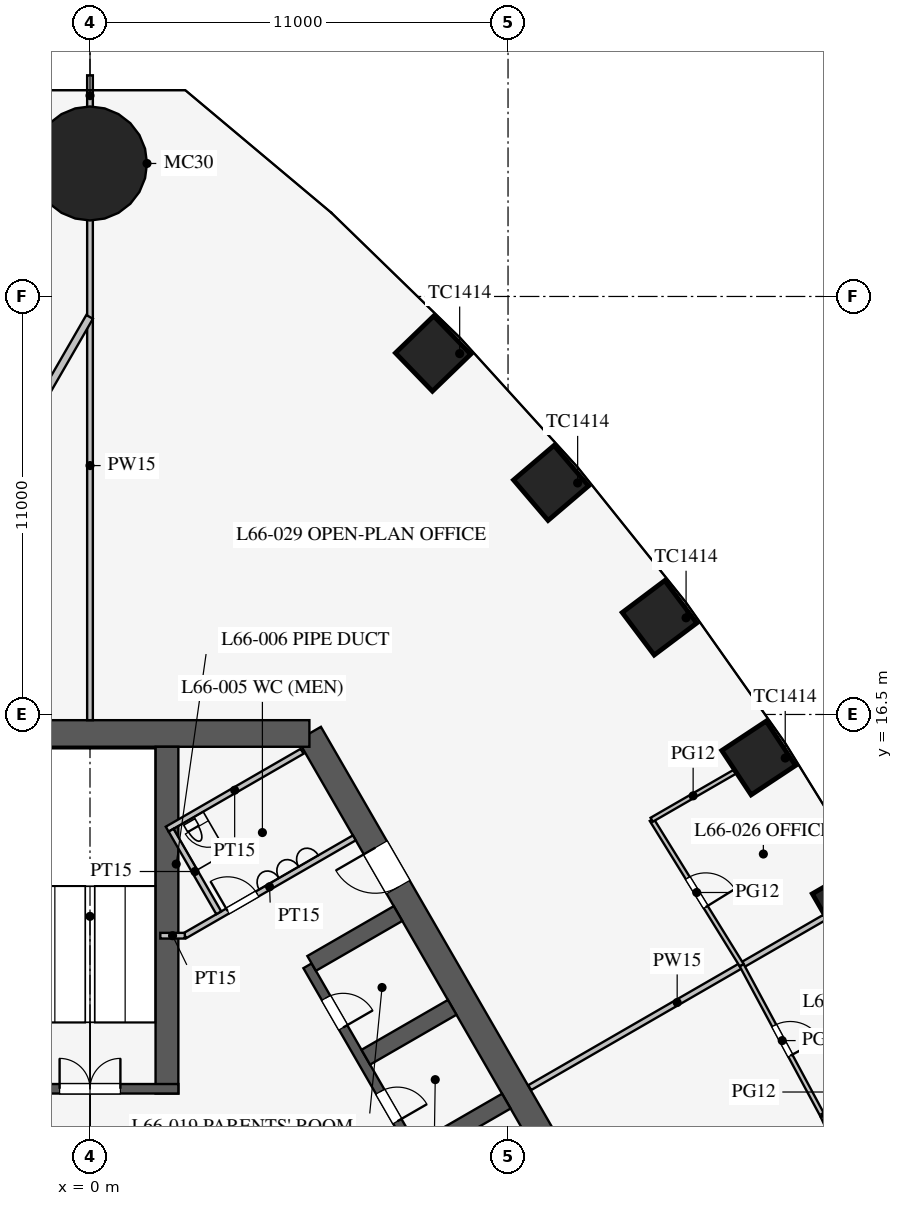
"""IFC4 building model, lengths in metres.
Left out: names, types, materials, properties, quantities, classifications, styles, units other than length and angle.
Written with IfcOpenShell. Run it as: python <this file> out.ifc"""

import sys

from ifc_helpers import new_model, si_unit, direction, frame, frame_2d, origin, origin_2d, place, context, subcontext, project, spatial, rectangle, circle, extrude, element, fill, save


model = new_model("IFC4")
c1 = context("Model", 3, precision=1e-05, world=origin(), true_north=direction((0.0, 1.0)))
c2 = subcontext(c1, "Body", "Model", "MODEL_VIEW")
j1 = project(units=[si_unit("LENGTHUNIT", "METRE"), si_unit("PLANEANGLEUNIT", "RADIAN")], contexts=[c1])
p1 = place(None, origin())
s1 = spatial("IfcSite", under=j1, at=p1, CompositionType="ELEMENT")
p2 = place(p1, origin())
s2 = spatial("IfcBuilding", under=s1, at=p2, CompositionType="ELEMENT")
p3 = place(p2, frame((0.0, 0.0, 288.9)))
s3 = spatial("IfcBuildingStorey", under=s2, at=p3, CompositionType="ELEMENT", Elevation=288.9)
for number, where, z_axis, x_axis in (
    (1, (19.963, 11.526, 0.0), (0.0, 0.0, 1.0), (-0.5, 0.866, 0.0)),
    (2, (17.594, 15.354, 0.0), (0.0, 0.0, 1.0), (-0.552, 0.834, 0.0)),
    (3, (14.985, 19.044, 0.0), (0.0, 0.0, 1.0), (-0.601, 0.799, 0.0)),
    (4, (12.132, 22.593, 0.0), (0.0, 0.0, 1.0), (-0.649, 0.761, 0.0)),
    (5, (9.027, 25.997, 0.0), (0.0, 0.0, 1.0), (-0.695, 0.719, 0.0)),
):
    element("IfcColumn", number, at=place(p3, frame(where, z_axis=z_axis, x_axis=x_axis)), inside=s3, PredefinedType="COLUMN", context=c2, shape_type="SweptSolid", body=[
        extrude(rectangle(XDim=1.4, YDim=1.4, at=origin_2d()), origin(), (0.0, 0.0, 1.0), 4.2),
    ])
p4 = place(p3, frame((0.0, 31.0, 0.0), z_axis=(0.0, 0.0, 1.0), x_axis=(1.0, 0.0, 0.0)))
e6 = element("IfcColumn", 6, at=p4, inside=s3, PredefinedType="COLUMN", context=c2, shape_type="SweptSolid", body=[
    extrude(circle(Radius=1.5, at=origin_2d()), origin(), (0.0, 0.0, 1.0), 4.2),
])
p5 = place(p3, frame((16.743, -3.0, 0.0), z_axis=(0.0, 0.0, 1.0), x_axis=(-0.500002442456, 0.866023993627, 0.0)))
e7 = element("IfcWall", 7, at=p5, inside=s3, PredefinedType="SHEAR", context=c2, shape_type="SweptSolid", body=[
    extrude(rectangle(XDim=21.939, YDim=0.7, at=frame_2d((10.97, 0.0))), origin(), (0.0, 0.0, 1.0), 4.2),
])
p6 = place(p5, frame((17.27, 0.0, 0.0)))
e8 = element("IfcOpeningElement", 8, at=p6, cuts=e7, PredefinedType="OPENING", context=c2, shape_type="SweptSolid", body=[
    extrude(rectangle(XDim=1.2, YDim=2.1, at=frame_2d((0.6, 1.05))), frame((0.0, 0.36, 0.0), z_axis=(0.0, -1.0, 0.0), x_axis=(1.0, 0.0, 0.0)), (0.0, 0.0, 1.0), 0.72),
])
p7 = place(p5, frame((3.47, 0.0, 0.0)))
e9 = element("IfcOpeningElement", 9, at=p7, cuts=e7, PredefinedType="OPENING", context=c2, shape_type="SweptSolid", body=[
    extrude(rectangle(XDim=1.2, YDim=2.1, at=frame_2d((0.6, 1.05))), frame((0.0, 0.36, 0.0), z_axis=(0.0, -1.0, 0.0), x_axis=(1.0, 0.0, 0.0)), (0.0, 0.0, 1.0), 0.72),
])
p8 = place(p3, frame((5.773, 16.0, 0.0), z_axis=(0.0, 0.0, 1.0), x_axis=(-1.0, 0.0, 0.0)))
e10 = element("IfcWall", 10, at=p8, inside=s3, PredefinedType="SHEAR", context=c2, shape_type="SweptSolid", body=[
    extrude(rectangle(XDim=11.547, YDim=0.7, at=frame_2d((5.773, 0.0))), origin(), (0.0, 0.0, 1.0), 4.2),
])
p9 = place(p3, frame((11.424, 0.014, 0.0), z_axis=(0.0, 0.0, 1.0), x_axis=(-0.500001763848, 0.866024385424, 0.0)))
e11 = element("IfcWall", 11, at=p9, inside=s3, PredefinedType="SHEAR", context=c2, shape_type="SweptSolid", body=[
    extrude(rectangle(XDim=11.4, YDim=0.25, at=frame_2d((5.7, 0.0))), origin(), (0.0, 0.0, 1.0), 4.2),
])
p10 = place(p9, frame((0.975, 0.0, 0.0)))
e12 = element("IfcOpeningElement", 12, at=p10, cuts=e11, PredefinedType="OPENING", context=c2, shape_type="SweptSolid", body=[
    extrude(rectangle(XDim=0.9, YDim=2.1, at=frame_2d((0.45, 1.05))), frame((0.0, 0.135, 0.0), z_axis=(0.0, -1.0, 0.0), x_axis=(1.0, 0.0, 0.0)), (0.0, 0.0, 1.0), 0.27),
])
p11 = place(p9, frame((3.825, 0.0, 0.0)))
e13 = element("IfcOpeningElement", 13, at=p11, cuts=e11, PredefinedType="OPENING", context=c2, shape_type="SweptSolid", body=[
    extrude(rectangle(XDim=0.9, YDim=2.1, at=frame_2d((0.45, 1.05))), frame((0.0, 0.135, 0.0), z_axis=(0.0, -1.0, 0.0), x_axis=(1.0, 0.0, 0.0)), (0.0, 0.0, 1.0), 0.27),
])
p12 = place(p9, frame((6.675, 0.0, 0.0)))
e14 = element("IfcOpeningElement", 14, at=p12, cuts=e11, PredefinedType="OPENING", context=c2, shape_type="SweptSolid", body=[
    extrude(rectangle(XDim=0.9, YDim=2.1, at=frame_2d((0.45, 1.05))), frame((0.0, 0.135, 0.0), z_axis=(0.0, -1.0, 0.0), x_axis=(1.0, 0.0, 0.0)), (0.0, 0.0, 1.0), 0.27),
])
p13 = place(p9, frame((9.525, 0.0, 0.0)))
e15 = element("IfcOpeningElement", 15, at=p13, cuts=e11, PredefinedType="OPENING", context=c2, shape_type="SweptSolid", body=[
    extrude(rectangle(XDim=0.9, YDim=2.1, at=frame_2d((0.45, 1.05))), frame((0.0, 0.135, 0.0), z_axis=(0.0, -1.0, 0.0), x_axis=(1.0, 0.0, 0.0)), (0.0, 0.0, 1.0), 0.27),
])
for number, where, z_axis, x_axis in (
    (16, (8.682, 5.012, 0.0), (0.0, 0.0, 1.0), (0.866, 0.5, 0.0)),
    (17, (7.257, 7.481, 0.0), (0.0, 0.0, 1.0), (0.866, 0.5, 0.0)),
    (18, (5.832, 9.949, 0.0), (0.0, 0.0, 1.0), (0.866, 0.5, 0.0)),
):
    element("IfcWall", number, at=place(p3, frame(where, z_axis=z_axis, x_axis=x_axis)), inside=s3, PredefinedType="SHEAR", context=c2, shape_type="SweptSolid", body=[
        extrude(rectangle(XDim=2.625, YDim=0.45, at=frame_2d((1.312, 0.0))), origin(), (0.0, 0.0, 1.0), 4.2),
    ])
p14 = place(p3, frame((2.025, 6.525, 0.0), z_axis=(0.0, 0.0, 1.0), x_axis=(0.0, 1.0, 0.0)))
e19 = element("IfcWall", 19, at=p14, inside=s3, PredefinedType="SHEAR", context=c2, shape_type="SweptSolid", body=[
    extrude(rectangle(XDim=9.125, YDim=0.6, at=frame_2d((4.562, 0.0))), origin(), (0.0, 0.0, 1.0), 4.2),
])
p15 = place(p3, frame((2.325, 6.65, 0.0), z_axis=(0.0, 0.0, 1.0), x_axis=(-1.0, 0.0, 0.0)))
e20 = element("IfcWall", 20, at=p15, inside=s3, PredefinedType="SHEAR", context=c2, shape_type="SweptSolid", body=[
    extrude(rectangle(XDim=4.65, YDim=0.25, at=frame_2d((2.325, 0.0))), origin(), (0.0, 0.0, 1.0), 4.2),
])
p16 = place(p15, frame((1.525, 0.0, 0.0)))
e21 = element("IfcOpeningElement", 21, at=p16, cuts=e20, PredefinedType="OPENING", context=c2, shape_type="SweptSolid", body=[
    extrude(rectangle(XDim=1.6, YDim=2.1, at=frame_2d((0.8, 1.05))), frame((0.0, 0.135, 0.0), z_axis=(0.0, -1.0, 0.0), x_axis=(1.0, 0.0, 0.0)), (0.0, 0.0, 1.0), 0.27),
])
p17 = place(p3, frame((2.495, 10.678, 0.0), z_axis=(0.0, 0.0, 1.0), x_axis=(0.866037967349, 0.499978238636, 0.0)))
e22 = element("IfcWall", 22, at=p17, inside=s3, PredefinedType="PARTITIONING", context=c2, shape_type="SweptSolid", body=[
    extrude(rectangle(XDim=5.15, YDim=0.15, at=frame_2d((2.575, 0.0))), origin(), (0.0, 0.0, 1.0), 4.0),
])
p18 = place(p17, frame((1.3, 0.0, 0.0)))
e23 = element("IfcOpeningElement", 23, at=p18, cuts=e22, PredefinedType="OPENING", context=c2, shape_type="SweptSolid", body=[
    extrude(rectangle(XDim=0.9, YDim=2.1, at=frame_2d((0.45, 1.05))), frame((0.0, 0.085, 0.0), z_axis=(0.0, -1.0, 0.0), x_axis=(1.0, 0.0, 0.0)), (0.0, 0.0, 1.0), 0.17),
])
p19 = place(p3, frame((2.495, 10.678, 0.0), z_axis=(0.0, 0.0, 1.0), x_axis=(-1.0, 0.0, 0.0)))
e24 = element("IfcWall", 24, at=p19, inside=s3, PredefinedType="PARTITIONING", context=c2, shape_type="SweptSolid", body=[
    extrude(rectangle(XDim=0.645, YDim=0.15, at=frame_2d((0.323, 0.0))), origin(), (0.0, 0.0, 1.0), 4.0),
])
p20 = place(p3, frame((2.031, 13.482, 0.0), z_axis=(0.0, 0.0, 1.0), x_axis=(0.866050731258, 0.499956128963, 0.0)))
e25 = element("IfcWall", 25, at=p20, inside=s3, PredefinedType="PARTITIONING", context=c2, shape_type="SweptSolid", body=[
    extrude(rectangle(XDim=4.1, YDim=0.15, at=frame_2d((2.05, 0.0))), origin(), (0.0, 0.0, 1.0), 4.0),
])
p21 = place(p3, frame((3.389, 11.281, 0.0), z_axis=(0.0, 0.0, 1.0), x_axis=(-0.499989096993, 0.866031698547, 0.0)))
e26 = element("IfcWall", 26, at=p21, inside=s3, PredefinedType="PARTITIONING", context=c2, shape_type="SweptSolid", body=[
    extrude(rectangle(XDim=2.51, YDim=0.15, at=frame_2d((1.255, 0.0))), origin(), (0.0, 0.0, 1.0), 4.0),
])
p22 = place(p3, frame((0.0, 16.35, 0.0), z_axis=(0.0, 0.0, 1.0), x_axis=(0.0, 1.0, 0.0)))
e27 = element("IfcWall", 27, at=p22, inside=s3, PredefinedType="PARTITIONING", context=c2, shape_type="SweptSolid", body=[
    extrude(rectangle(XDim=13.4, YDim=0.15, at=frame_2d((6.7, 0.0))), origin(), (0.0, 0.0, 1.0), 2.5),
])
p23 = place(p3, frame((0.0, 32.25, 0.0), z_axis=(0.0, 0.0, 1.0), x_axis=(0.0, 1.0, 0.0)))
e28 = element("IfcWall", 28, at=p23, inside=s3, PredefinedType="PARTITIONING", context=c2, shape_type="SweptSolid", body=[
    extrude(rectangle(XDim=1.07, YDim=0.15, at=frame_2d((0.535, 0.0))), origin(), (0.0, 0.0, 1.0), 2.5),
])
p24 = place(p3, frame((11.57, 6.68, 0.0), z_axis=(0.0, 0.0, 1.0), x_axis=(0.866018180823, 0.500012510328, 0.0)))
e29 = element("IfcWall", 29, at=p24, inside=s3, PredefinedType="PARTITIONING", context=c2, shape_type="SweptSolid", body=[
    extrude(rectangle(XDim=8.962, YDim=0.15, at=frame_2d((4.481, 0.0))), origin(), (0.0, 0.0, 1.0), 3.3),
])
p25 = place(p3, frame((17.149, 9.901, 0.0), z_axis=(0.0, 0.0, 1.0), x_axis=(-0.525981173851, 0.850496210899, 0.0)))
e30 = element("IfcWall", 30, at=p25, inside=s3, PredefinedType="PARTITIONING", context=c2, shape_type="SweptSolid", body=[
    extrude(rectangle(XDim=4.502, YDim=0.12, at=frame_2d((2.251, 0.0))), origin(), (0.0, 0.0, 1.0), 2.9),
])
p26 = place(p25, frame((1.8, 0.0, 0.15)))
e31 = element("IfcOpeningElement", 31, at=p26, cuts=e30, PredefinedType="OPENING", context=c2, shape_type="SweptSolid", body=[
    extrude(rectangle(XDim=0.9, YDim=2.1, at=frame_2d((0.45, 1.05))), frame((0.0, 0.07, 0.0), z_axis=(0.0, -1.0, 0.0), x_axis=(1.0, 0.0, 0.0)), (0.0, 0.0, 1.0), 0.14),
])
p27 = place(p3, frame((19.281, 5.936, 0.0), z_axis=(0.0, 0.0, 1.0), x_axis=(-0.473566170147, 0.880758242932, 0.0)))
e32 = element("IfcWall", 32, at=p27, inside=s3, PredefinedType="PARTITIONING", context=c2, shape_type="SweptSolid", body=[
    extrude(rectangle(XDim=4.502, YDim=0.12, at=frame_2d((2.251, 0.0))), origin(), (0.0, 0.0, 1.0), 2.9),
])
p28 = place(p27, frame((1.8, 0.0, 0.15)))
e33 = element("IfcOpeningElement", 33, at=p28, cuts=e32, PredefinedType="OPENING", context=c2, shape_type="SweptSolid", body=[
    extrude(rectangle(XDim=0.9, YDim=2.1, at=frame_2d((0.45, 1.05))), frame((0.0, 0.07, 0.0), z_axis=(0.0, -1.0, 0.0), x_axis=(1.0, 0.0, 0.0)), (0.0, 0.0, 1.0), 0.14),
])
p29 = place(p3, frame((21.175, 1.833, 0.0), z_axis=(0.0, 0.0, 1.0), x_axis=(-0.419270595022, 0.907861315483, 0.0)))
e34 = element("IfcWall", 34, at=p29, inside=s3, PredefinedType="PARTITIONING", context=c2, shape_type="SweptSolid", body=[
    extrude(rectangle(XDim=4.519, YDim=0.12, at=frame_2d((2.259, 0.0))), origin(), (0.0, 0.0, 1.0), 2.9),
])
p30 = place(p29, frame((1.75, 0.0, 0.15)))
e35 = element("IfcOpeningElement", 35, at=p30, cuts=e34, PredefinedType="OPENING", context=c2, shape_type="SweptSolid", body=[
    extrude(rectangle(XDim=1.0, YDim=2.1, at=frame_2d((0.5, 1.05))), frame((0.0, 0.07, 0.0), z_axis=(0.0, -1.0, 0.0), x_axis=(1.0, 0.0, 0.0)), (0.0, 0.0, 1.0), 0.14),
])
for number, where, z_axis, x_axis in (
    (36, (14.781, 13.73, 0.0), (0.0, 0.0, 1.0), (0.866, 0.5, 0.0)),
    (37, (19.281, 5.936, 0.0), (0.0, 0.0, 1.0), (0.866, 0.5, 0.0)),
):
    element("IfcWall", number, at=place(p3, frame(where, z_axis=z_axis, x_axis=x_axis)), inside=s3, PredefinedType="PARTITIONING", context=c2, shape_type="SweptSolid", body=[
        extrude(rectangle(XDim=2.517, YDim=0.12, at=frame_2d((1.259, 0.0))), origin(), (0.0, 0.0, 1.0), 2.9),
    ])
p31 = place(p3, frame((-4.933, 18.436, 0.0), z_axis=(0.0, 0.0, 1.0), x_axis=(0.500003655525, 0.866023293256, 0.0)))
e38 = element("IfcWall", 38, at=p31, inside=s3, PredefinedType="PARTITIONING", context=c2, shape_type="SweptSolid", body=[
    extrude(rectangle(XDim=9.845, YDim=0.2, at=frame_2d((4.923, 0.0))), origin(), (0.0, 0.0, 1.0), 2.9),
])
p32 = place(p31, frame((1.2, 0.0, 0.15)))
e39 = element("IfcOpeningElement", 39, at=p32, cuts=e38, PredefinedType="OPENING", context=c2, shape_type="SweptSolid", body=[
    extrude(rectangle(XDim=1.8, YDim=2.1, at=frame_2d((0.9, 1.05))), frame((0.0, 0.11, 0.0), z_axis=(0.0, -1.0, 0.0), x_axis=(1.0, 0.0, 0.0)), (0.0, 0.0, 1.0), 0.22),
])
p33 = place(p18, origin())
e40 = element("IfcDoor", 40, at=p33, inside=s3, OperationType="SINGLE_SWING_LEFT", PredefinedType="DOOR", context=c2, shape_type="SweptSolid", body=[
    extrude(rectangle(XDim=0.9, YDim=2.1, at=frame_2d((0.45, 1.05))), frame((0.0, 0.025, 0.0), z_axis=(0.0, -1.0, 0.0), x_axis=(1.0, 0.0, 0.0)), (0.0, 0.0, 1.0), 0.05),
])
fill(e23, e40)
p34 = place(p16, frame((1.6, 0.0, 0.0), z_axis=(0.0, 0.0, 1.0), x_axis=(-1.0, 0.0, 0.0)))
e41 = element("IfcDoor", 41, at=p34, inside=s3, OperationType="DOUBLE_DOOR_SINGLE_SWING", PredefinedType="DOOR", context=c2, shape_type="SweptSolid", body=[
    extrude(rectangle(XDim=1.6, YDim=2.1, at=frame_2d((0.8, 1.05))), frame((0.0, 0.025, 0.0), z_axis=(0.0, -1.0, 0.0), x_axis=(1.0, 0.0, 0.0)), (0.0, 0.0, 1.0), 0.05),
])
fill(e21, e41)
p35 = place(p6, origin())
e42 = element("IfcDoor", 42, at=p35, inside=s3, OperationType="SINGLE_SWING_RIGHT", PredefinedType="DOOR", context=c2, shape_type="SweptSolid", body=[
    extrude(rectangle(XDim=1.2, YDim=2.1, at=frame_2d((0.6, 1.05))), frame((0.0, 0.025, 0.0), z_axis=(0.0, -1.0, 0.0), x_axis=(1.0, 0.0, 0.0)), (0.0, 0.0, 1.0), 0.05),
])
fill(e8, e42)
p36 = place(p12, frame((0.9, 0.0, 0.0), z_axis=(0.0, 0.0, 1.0), x_axis=(-1.0, 0.0, 0.0)))
e43 = element("IfcDoor", 43, at=p36, inside=s3, OperationType="SINGLE_SWING_RIGHT", PredefinedType="DOOR", context=c2, shape_type="SweptSolid", body=[
    extrude(rectangle(XDim=0.9, YDim=2.1, at=frame_2d((0.45, 1.05))), frame((0.0, 0.025, 0.0), z_axis=(0.0, -1.0, 0.0), x_axis=(1.0, 0.0, 0.0)), (0.0, 0.0, 1.0), 0.05),
])
fill(e14, e43)
p37 = place(p13, frame((0.9, 0.0, 0.0), z_axis=(0.0, 0.0, 1.0), x_axis=(-1.0, 0.0, 0.0)))
e44 = element("IfcDoor", 44, at=p37, inside=s3, OperationType="SINGLE_SWING_RIGHT", PredefinedType="DOOR", context=c2, shape_type="SweptSolid", body=[
    extrude(rectangle(XDim=0.9, YDim=2.1, at=frame_2d((0.45, 1.05))), frame((0.0, 0.025, 0.0), z_axis=(0.0, -1.0, 0.0), x_axis=(1.0, 0.0, 0.0)), (0.0, 0.0, 1.0), 0.05),
])
fill(e15, e44)
p38 = place(p26, frame((0.9, 0.0, 0.0), z_axis=(0.0, 0.0, 1.0), x_axis=(-1.0, 0.0, 0.0)))
e45 = element("IfcDoor", 45, at=p38, inside=s3, OperationType="SINGLE_SWING_RIGHT", PredefinedType="DOOR", context=c2, shape_type="SweptSolid", body=[
    extrude(rectangle(XDim=0.9, YDim=2.1, at=frame_2d((0.45, 1.05))), frame((0.0, 0.025, 0.0), z_axis=(0.0, -1.0, 0.0), x_axis=(1.0, 0.0, 0.0)), (0.0, 0.0, 1.0), 0.05),
])
fill(e31, e45)
p39 = place(p28, frame((0.9, 0.0, 0.0), z_axis=(0.0, 0.0, 1.0), x_axis=(-1.0, 0.0, 0.0)))
e46 = element("IfcDoor", 46, at=p39, inside=s3, OperationType="SINGLE_SWING_RIGHT", PredefinedType="DOOR", context=c2, shape_type="SweptSolid", body=[
    extrude(rectangle(XDim=0.9, YDim=2.1, at=frame_2d((0.45, 1.05))), frame((0.0, 0.025, 0.0), z_axis=(0.0, -1.0, 0.0), x_axis=(1.0, 0.0, 0.0)), (0.0, 0.0, 1.0), 0.05),
])
fill(e33, e46)
save(model, sys.argv[1])
